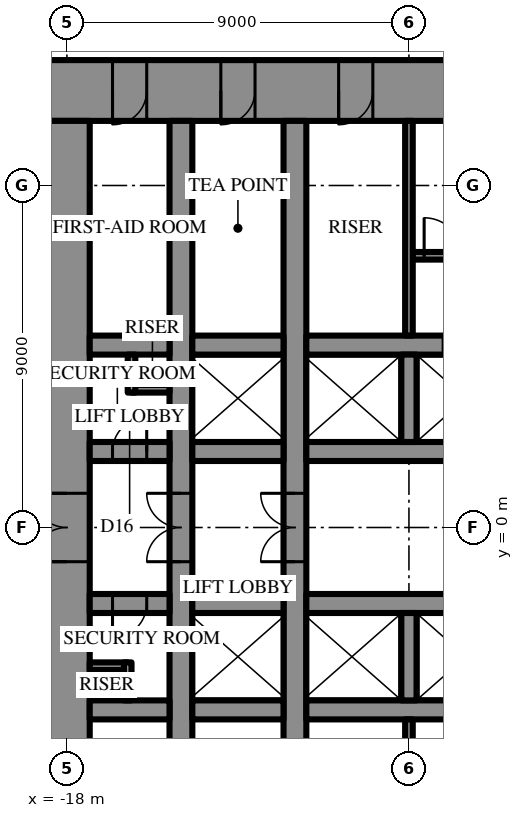
"""IFC4 building model, lengths in metres.
Left out: names, types, materials, properties, quantities, classifications, styles, units other than length and angle.
Written with IfcOpenShell. Run it as: python <this file> out.ifc"""

import sys

from ifc_helpers import new_model, si_unit, direction, frame, frame_2d, origin, place, context, subcontext, project, spatial, rectangle, extrude, element, fill, save


model = new_model("IFC4")
c1 = context("Model", 3, precision=1e-05, world=origin(), true_north=direction((0.0, 1.0)))
c2 = subcontext(c1, "Body", "Model", "MODEL_VIEW")
j1 = project(units=[si_unit("LENGTHUNIT", "METRE"), si_unit("PLANEANGLEUNIT", "RADIAN")], contexts=[c1])
p1 = place(None, origin())
s1 = spatial("IfcSite", under=j1, at=p1, CompositionType="ELEMENT")
p2 = place(p1, origin())
s2 = spatial("IfcBuilding", under=s1, at=p2, CompositionType="ELEMENT")
p3 = place(p2, frame((0.0, 0.0, 195.1)))
s3 = spatial("IfcBuildingStorey", under=s2, at=p3, CompositionType="ELEMENT", Elevation=195.1)
p4 = place(p3, frame((-18.6, 11.5, 0.0), z_axis=(0.0, 0.0, 1.0), x_axis=(1.0, 0.0, 0.0)))
e1 = element("IfcWall", 1, at=p4, inside=s3, PredefinedType="SHEAR", context=c2, shape_type="SweptSolid", body=[
    extrude(rectangle(XDim=37.2, YDim=1.6, at=frame_2d((18.6, 0.0))), origin(), (0.0, 0.0, 1.0), 4.2),
])
p5 = place(p4, frame((19.45, 0.0, 0.0)))
e2 = element("IfcOpeningElement", 2, at=p5, cuts=e1, PredefinedType="OPENING", context=c2, shape_type="SweptSolid", body=[
    extrude(rectangle(XDim=0.9, YDim=2.2, at=frame_2d((0.45, 1.1))), frame((0.0, 0.81, 0.0), z_axis=(0.0, -1.0, 0.0), x_axis=(1.0, 0.0, 0.0)), (0.0, 0.0, 1.0), 1.62),
])
p6 = place(p4, frame((22.45, 0.0, 0.0)))
e3 = element("IfcOpeningElement", 3, at=p6, cuts=e1, PredefinedType="OPENING", context=c2, shape_type="SweptSolid", body=[
    extrude(rectangle(XDim=0.9, YDim=2.2, at=frame_2d((0.45, 1.1))), frame((0.0, 0.81, 0.0), z_axis=(0.0, -1.0, 0.0), x_axis=(1.0, 0.0, 0.0)), (0.0, 0.0, 1.0), 1.62),
])
p7 = place(p4, frame((25.5, 0.0, 0.0)))
e4 = element("IfcOpeningElement", 4, at=p7, cuts=e1, PredefinedType="OPENING", context=c2, shape_type="SweptSolid", body=[
    extrude(rectangle(XDim=1.0, YDim=2.2, at=frame_2d((0.5, 1.1))), frame((0.0, 0.81, 0.0), z_axis=(0.0, -1.0, 0.0), x_axis=(1.0, 0.0, 0.0)), (0.0, 0.0, 1.0), 1.62),
])
p8 = place(p4, frame((1.8, 0.0, 0.0)))
e5 = element("IfcOpeningElement", 5, at=p8, cuts=e1, PredefinedType="OPENING", context=c2, shape_type="SweptSolid", body=[
    extrude(rectangle(XDim=0.9, YDim=2.2, at=frame_2d((0.45, 1.1))), frame((0.0, 0.81, 0.0), z_axis=(0.0, -1.0, 0.0), x_axis=(1.0, 0.0, 0.0)), (0.0, 0.0, 1.0), 1.62),
])
p9 = place(p4, frame((4.65, 0.0, 0.0)))
e6 = element("IfcOpeningElement", 6, at=p9, cuts=e1, PredefinedType="OPENING", context=c2, shape_type="SweptSolid", body=[
    extrude(rectangle(XDim=0.9, YDim=2.2, at=frame_2d((0.45, 1.1))), frame((0.0, 0.81, 0.0), z_axis=(0.0, -1.0, 0.0), x_axis=(1.0, 0.0, 0.0)), (0.0, 0.0, 1.0), 1.62),
])
p10 = place(p4, frame((7.75, 0.0, 0.0)))
e7 = element("IfcOpeningElement", 7, at=p10, cuts=e1, PredefinedType="OPENING", context=c2, shape_type="SweptSolid", body=[
    extrude(rectangle(XDim=0.9, YDim=2.2, at=frame_2d((0.45, 1.1))), frame((0.0, 0.81, 0.0), z_axis=(0.0, -1.0, 0.0), x_axis=(1.0, 0.0, 0.0)), (0.0, 0.0, 1.0), 1.62),
])
p11 = place(p4, frame((28.55, 0.0, 0.0)))
e8 = element("IfcOpeningElement", 8, at=p11, cuts=e1, PredefinedType="OPENING", context=c2, shape_type="SweptSolid", body=[
    extrude(rectangle(XDim=0.9, YDim=2.2, at=frame_2d((0.45, 1.1))), frame((0.0, 0.81, 0.0), z_axis=(0.0, -1.0, 0.0), x_axis=(1.0, 0.0, 0.0)), (0.0, 0.0, 1.0), 1.62),
])
p12 = place(p4, frame((31.65, 0.0, 0.0)))
e9 = element("IfcOpeningElement", 9, at=p12, cuts=e1, PredefinedType="OPENING", context=c2, shape_type="SweptSolid", body=[
    extrude(rectangle(XDim=0.9, YDim=2.2, at=frame_2d((0.45, 1.1))), frame((0.0, 0.81, 0.0), z_axis=(0.0, -1.0, 0.0), x_axis=(1.0, 0.0, 0.0)), (0.0, 0.0, 1.0), 1.62),
])
p13 = place(p4, frame((34.5, 0.0, 0.0)))
e10 = element("IfcOpeningElement", 10, at=p13, cuts=e1, PredefinedType="OPENING", context=c2, shape_type="SweptSolid", body=[
    extrude(rectangle(XDim=0.9, YDim=2.2, at=frame_2d((0.45, 1.1))), frame((0.0, 0.81, 0.0), z_axis=(0.0, -1.0, 0.0), x_axis=(1.0, 0.0, 0.0)), (0.0, 0.0, 1.0), 1.62),
])
p14 = place(p3, frame((-18.0, 10.7, 0.0), z_axis=(0.0, 0.0, 1.0), x_axis=(0.0, -1.0, 0.0)))
e11 = element("IfcWall", 11, at=p14, inside=s3, PredefinedType="SHEAR", context=c2, shape_type="SweptSolid", body=[
    extrude(rectangle(XDim=21.4, YDim=1.2, at=frame_2d((10.7, 0.0))), origin(), (0.0, 0.0, 1.0), 4.2),
])
p15 = place(p14, frame((9.8, 0.0, 0.0)))
e12 = element("IfcOpeningElement", 12, at=p15, cuts=e11, PredefinedType="OPENING", context=c2, shape_type="SweptSolid", body=[
    extrude(rectangle(XDim=1.8, YDim=2.4, at=frame_2d((0.9, 1.2))), frame((0.0, 0.61, 0.0), z_axis=(0.0, -1.0, 0.0), x_axis=(1.0, 0.0, 0.0)), (0.0, 0.0, 1.0), 1.22),
])
p16 = place(p3, frame((-12.0, -10.7, 0.0), z_axis=(0.0, 0.0, 1.0), x_axis=(0.0, 1.0, 0.0)))
e13 = element("IfcWall", 13, at=p16, inside=s3, PredefinedType="SHEAR", context=c2, shape_type="SweptSolid", body=[
    extrude(rectangle(XDim=21.4, YDim=0.6, at=frame_2d((10.7, 0.0))), origin(), (0.0, 0.0, 1.0), 4.2),
])
p17 = place(p16, frame((9.8, 0.0, 0.0)))
e14 = element("IfcOpeningElement", 14, at=p17, cuts=e13, PredefinedType="OPENING", context=c2, shape_type="SweptSolid", body=[
    extrude(rectangle(XDim=1.8, YDim=2.4, at=frame_2d((0.9, 1.2))), frame((0.0, 0.31, 0.0), z_axis=(0.0, -1.0, 0.0), x_axis=(1.0, 0.0, 0.0)), (0.0, 0.0, 1.0), 0.62),
])
p18 = place(p3, frame((-15.0, -10.7, 0.0), z_axis=(0.0, 0.0, 1.0), x_axis=(0.0, 1.0, 0.0)))
e15 = element("IfcWall", 15, at=p18, inside=s3, PredefinedType="SHEAR", context=c2, shape_type="SweptSolid", body=[
    extrude(rectangle(XDim=21.4, YDim=0.6, at=frame_2d((10.7, 0.0))), origin(), (0.0, 0.0, 1.0), 4.2),
])
p19 = place(p18, frame((9.8, 0.0, 0.0)))
e16 = element("IfcOpeningElement", 16, at=p19, cuts=e15, PredefinedType="OPENING", context=c2, shape_type="SweptSolid", body=[
    extrude(rectangle(XDim=1.8, YDim=2.4, at=frame_2d((0.9, 1.2))), frame((0.0, 0.31, 0.0), z_axis=(0.0, -1.0, 0.0), x_axis=(1.0, 0.0, 0.0)), (0.0, 0.0, 1.0), 0.62),
])
p20 = place(p3, frame((-17.4, 2.0, 0.0), z_axis=(0.0, 0.0, 1.0), x_axis=(1.0, 0.0, 0.0)))
e17 = element("IfcWall", 17, at=p20, inside=s3, PredefinedType="SHEAR", context=c2, shape_type="SweptSolid", body=[
    extrude(rectangle(XDim=2.1, YDim=0.5, at=frame_2d((1.05, 0.0))), origin(), (0.0, 0.0, 1.0), 4.2),
])
p21 = place(p20, frame((0.6, 0.0, 0.0)))
e18 = element("IfcOpeningElement", 18, at=p21, cuts=e17, PredefinedType="OPENING", context=c2, shape_type="SweptSolid", body=[
    extrude(rectangle(XDim=0.9, YDim=2.2, at=frame_2d((0.45, 1.1))), frame((0.0, 0.26, 0.0), z_axis=(0.0, -1.0, 0.0), x_axis=(1.0, 0.0, 0.0)), (0.0, 0.0, 1.0), 0.52),
])
p22 = place(p3, frame((-14.7, 2.0, 0.0), z_axis=(0.0, 0.0, 1.0), x_axis=(1.0, 0.0, 0.0)))
e19 = element("IfcWall", 19, at=p22, inside=s3, PredefinedType="SHEAR", context=c2, shape_type="SweptSolid", body=[
    extrude(rectangle(XDim=2.4, YDim=0.5, at=frame_2d((1.2, 0.0))), origin(), (0.0, 0.0, 1.0), 4.2),
])
p23 = place(p3, frame((-11.7, 2.0, 0.0), z_axis=(0.0, 0.0, 1.0), x_axis=(1.0, 0.0, 0.0)))
e20 = element("IfcWall", 20, at=p23, inside=s3, PredefinedType="SHEAR", context=c2, shape_type="SweptSolid", body=[
    extrude(rectangle(XDim=5.9, YDim=0.5, at=frame_2d((2.95, 0.0))), origin(), (0.0, 0.0, 1.0), 4.2),
])
p24 = place(p3, frame((-17.4, 4.8, 0.0), z_axis=(0.0, 0.0, 1.0), x_axis=(1.0, 0.0, 0.0)))
e21 = element("IfcWall", 21, at=p24, inside=s3, PredefinedType="SHEAR", context=c2, shape_type="SweptSolid", body=[
    extrude(rectangle(XDim=2.1, YDim=0.5, at=frame_2d((1.05, 0.0))), origin(), (0.0, 0.0, 1.0), 4.2),
])
p25 = place(p3, frame((-14.7, 4.8, 0.0), z_axis=(0.0, 0.0, 1.0), x_axis=(1.0, 0.0, 0.0)))
e22 = element("IfcWall", 22, at=p25, inside=s3, PredefinedType="SHEAR", context=c2, shape_type="SweptSolid", body=[
    extrude(rectangle(XDim=2.4, YDim=0.5, at=frame_2d((1.2, 0.0))), origin(), (0.0, 0.0, 1.0), 4.2),
])
p26 = place(p3, frame((-11.7, 4.8, 0.0), z_axis=(0.0, 0.0, 1.0), x_axis=(1.0, 0.0, 0.0)))
e23 = element("IfcWall", 23, at=p26, inside=s3, PredefinedType="SHEAR", context=c2, shape_type="SweptSolid", body=[
    extrude(rectangle(XDim=23.4, YDim=0.5, at=frame_2d((11.7, 0.0))), origin(), (0.0, 0.0, 1.0), 4.2),
])
p27 = place(p26, frame((6.6, 0.0, 0.0)))
e24 = element("IfcOpeningElement", 24, at=p27, cuts=e23, PredefinedType="OPENING", context=c2, shape_type="SweptSolid", body=[
    extrude(rectangle(XDim=1.2, YDim=2.2, at=frame_2d((0.6, 1.1))), frame((0.0, 0.26, 0.0), z_axis=(0.0, -1.0, 0.0), x_axis=(1.0, 0.0, 0.0)), (0.0, 0.0, 1.0), 0.52),
])
p28 = place(p26, frame((3.6, 0.0, 0.0)))
e25 = element("IfcOpeningElement", 25, at=p28, cuts=e23, PredefinedType="OPENING", context=c2, shape_type="SweptSolid", body=[
    extrude(rectangle(XDim=1.2, YDim=2.2, at=frame_2d((0.6, 1.1))), frame((0.0, 0.26, 0.0), z_axis=(0.0, -1.0, 0.0), x_axis=(1.0, 0.0, 0.0)), (0.0, 0.0, 1.0), 0.52),
])
p29 = place(p3, frame((-9.0, 2.25, 0.0), z_axis=(0.0, 0.0, 1.0), x_axis=(0.0, 1.0, 0.0)))
e26 = element("IfcWall", 26, at=p29, inside=s3, PredefinedType="SHEAR", context=c2, shape_type="SweptSolid", body=[
    extrude(rectangle(XDim=2.3, YDim=0.4, at=frame_2d((1.15, 0.0))), origin(), (0.0, 0.0, 1.0), 4.2),
])
p30 = place(p3, frame((-8.9, 7.15, 0.0), z_axis=(0.0, 0.0, 1.0), x_axis=(1.0, 0.0, 0.0)))
e27 = element("IfcWall", 27, at=p30, inside=s3, PredefinedType="SHEAR", context=c2, shape_type="SweptSolid", body=[
    extrude(rectangle(XDim=8.6, YDim=0.2, at=frame_2d((4.3, 0.0))), origin(), (0.0, 0.0, 1.0), 4.2),
])
p31 = place(p30, frame((0.3, 0.0, 0.0)))
e28 = element("IfcOpeningElement", 28, at=p31, cuts=e27, PredefinedType="OPENING", context=c2, shape_type="SweptSolid", body=[
    extrude(rectangle(XDim=1.0, YDim=2.2, at=frame_2d((0.5, 1.1))), frame((0.0, 0.11, 0.0), z_axis=(0.0, -1.0, 0.0), x_axis=(1.0, 0.0, 0.0)), (0.0, 0.0, 1.0), 0.22),
])
p32 = place(p3, frame((3.2, -2.0, 0.0), z_axis=(0.0, 0.0, 1.0), x_axis=(-1.0, 0.0, 0.0)))
e29 = element("IfcWall", 29, at=p32, inside=s3, PredefinedType="SHEAR", context=c2, shape_type="SweptSolid", body=[
    extrude(rectangle(XDim=14.9, YDim=0.5, at=frame_2d((7.45, 0.0))), origin(), (0.0, 0.0, 1.0), 4.2),
])
p33 = place(p32, frame((1.15, 0.0, 0.0)))
e30 = element("IfcOpeningElement", 30, at=p33, cuts=e29, PredefinedType="OPENING", context=c2, shape_type="SweptSolid", body=[
    extrude(rectangle(XDim=1.1, YDim=2.2, at=frame_2d((0.55, 1.1))), frame((0.0, 0.26, 0.0), z_axis=(0.0, -1.0, 0.0), x_axis=(1.0, 0.0, 0.0)), (0.0, 0.0, 1.0), 0.52),
])
p34 = place(p32, frame((4.15, 0.0, 0.0)))
e31 = element("IfcOpeningElement", 31, at=p34, cuts=e29, PredefinedType="OPENING", context=c2, shape_type="SweptSolid", body=[
    extrude(rectangle(XDim=1.1, YDim=2.2, at=frame_2d((0.55, 1.1))), frame((0.0, 0.26, 0.0), z_axis=(0.0, -1.0, 0.0), x_axis=(1.0, 0.0, 0.0)), (0.0, 0.0, 1.0), 0.52),
])
p35 = place(p32, frame((7.15, 0.0, 0.0)))
e32 = element("IfcOpeningElement", 32, at=p35, cuts=e29, PredefinedType="OPENING", context=c2, shape_type="SweptSolid", body=[
    extrude(rectangle(XDim=1.1, YDim=2.2, at=frame_2d((0.55, 1.1))), frame((0.0, 0.26, 0.0), z_axis=(0.0, -1.0, 0.0), x_axis=(1.0, 0.0, 0.0)), (0.0, 0.0, 1.0), 0.52),
])
p36 = place(p32, frame((10.15, 0.0, 0.0)))
e33 = element("IfcOpeningElement", 33, at=p36, cuts=e29, PredefinedType="OPENING", context=c2, shape_type="SweptSolid", body=[
    extrude(rectangle(XDim=1.1, YDim=2.2, at=frame_2d((0.55, 1.1))), frame((0.0, 0.26, 0.0), z_axis=(0.0, -1.0, 0.0), x_axis=(1.0, 0.0, 0.0)), (0.0, 0.0, 1.0), 0.52),
])
p37 = place(p3, frame((-12.3, -2.0, 0.0), z_axis=(0.0, 0.0, 1.0), x_axis=(-1.0, 0.0, 0.0)))
e34 = element("IfcWall", 34, at=p37, inside=s3, PredefinedType="SHEAR", context=c2, shape_type="SweptSolid", body=[
    extrude(rectangle(XDim=2.4, YDim=0.5, at=frame_2d((1.2, 0.0))), origin(), (0.0, 0.0, 1.0), 4.2),
])
p38 = place(p3, frame((-15.3, -2.0, 0.0), z_axis=(0.0, 0.0, 1.0), x_axis=(-1.0, 0.0, 0.0)))
e35 = element("IfcWall", 35, at=p38, inside=s3, PredefinedType="SHEAR", context=c2, shape_type="SweptSolid", body=[
    extrude(rectangle(XDim=2.1, YDim=0.5, at=frame_2d((1.05, 0.0))), origin(), (0.0, 0.0, 1.0), 4.2),
])
p39 = place(p38, frame((0.6, 0.0, 0.0)))
e36 = element("IfcOpeningElement", 36, at=p39, cuts=e35, PredefinedType="OPENING", context=c2, shape_type="SweptSolid", body=[
    extrude(rectangle(XDim=0.9, YDim=2.2, at=frame_2d((0.45, 1.1))), frame((0.0, 0.26, 0.0), z_axis=(0.0, -1.0, 0.0), x_axis=(1.0, 0.0, 0.0)), (0.0, 0.0, 1.0), 0.52),
])
p40 = place(p3, frame((11.7, -4.8, 0.0), z_axis=(0.0, 0.0, 1.0), x_axis=(-1.0, 0.0, 0.0)))
e37 = element("IfcWall", 37, at=p40, inside=s3, PredefinedType="SHEAR", context=c2, shape_type="SweptSolid", body=[
    extrude(rectangle(XDim=23.4, YDim=0.5, at=frame_2d((11.7, 0.0))), origin(), (0.0, 0.0, 1.0), 4.2),
])
p41 = place(p40, frame((6.6, 0.0, 0.0)))
e38 = element("IfcOpeningElement", 38, at=p41, cuts=e37, PredefinedType="OPENING", context=c2, shape_type="SweptSolid", body=[
    extrude(rectangle(XDim=1.2, YDim=2.2, at=frame_2d((0.6, 1.1))), frame((0.0, 0.26, 0.0), z_axis=(0.0, -1.0, 0.0), x_axis=(1.0, 0.0, 0.0)), (0.0, 0.0, 1.0), 0.52),
])
p42 = place(p40, frame((3.6, 0.0, 0.0)))
e39 = element("IfcOpeningElement", 39, at=p42, cuts=e37, PredefinedType="OPENING", context=c2, shape_type="SweptSolid", body=[
    extrude(rectangle(XDim=1.2, YDim=2.2, at=frame_2d((0.6, 1.1))), frame((0.0, 0.26, 0.0), z_axis=(0.0, -1.0, 0.0), x_axis=(1.0, 0.0, 0.0)), (0.0, 0.0, 1.0), 0.52),
])
p43 = place(p3, frame((-12.3, -4.8, 0.0), z_axis=(0.0, 0.0, 1.0), x_axis=(-1.0, 0.0, 0.0)))
e40 = element("IfcWall", 40, at=p43, inside=s3, PredefinedType="SHEAR", context=c2, shape_type="SweptSolid", body=[
    extrude(rectangle(XDim=2.4, YDim=0.5, at=frame_2d((1.2, 0.0))), origin(), (0.0, 0.0, 1.0), 4.2),
])
p44 = place(p3, frame((-15.3, -4.8, 0.0), z_axis=(0.0, 0.0, 1.0), x_axis=(-1.0, 0.0, 0.0)))
e41 = element("IfcWall", 41, at=p44, inside=s3, PredefinedType="SHEAR", context=c2, shape_type="SweptSolid", body=[
    extrude(rectangle(XDim=2.1, YDim=0.5, at=frame_2d((1.05, 0.0))), origin(), (0.0, 0.0, 1.0), 4.2),
])
p45 = place(p3, frame((-9.0, -2.25, 0.0), z_axis=(0.0, 0.0, 1.0), x_axis=(0.0, -1.0, 0.0)))
e42 = element("IfcWall", 42, at=p45, inside=s3, PredefinedType="SHEAR", context=c2, shape_type="SweptSolid", body=[
    extrude(rectangle(XDim=2.3, YDim=0.4, at=frame_2d((1.15, 0.0))), origin(), (0.0, 0.0, 1.0), 4.2),
])
for number, where, z_axis, x_axis in (
    (43, (-9.0, 5.05, 0.0), (0.0, 0.0, 1.0), (0.0, 1.0, 0.0)),
    (44, (-9.0, -5.05, 0.0), (0.0, 0.0, 1.0), (0.0, -1.0, 0.0)),
):
    element("IfcWall", number, at=place(p3, frame(where, z_axis=z_axis, x_axis=x_axis)), inside=s3, PredefinedType="PARTITIONING", context=c2, shape_type="SweptSolid", body=[
        extrude(rectangle(XDim=5.65, YDim=0.2, at=frame_2d((2.825, 0.0))), origin(), (0.0, 0.0, 1.0), 4.0),
    ])
for number, where, z_axis, x_axis in (
    (45, (-16.3, 3.65, 0.0), (0.0, 0.0, 1.0), (1.0, 0.0, 0.0)),
    (46, (-16.3, 3.55, 0.0), (0.0, 0.0, 1.0), (0.0, 1.0, 0.0)),
    (47, (-16.4, -3.65, 0.0), (0.0, 0.0, 1.0), (-1.0, 0.0, 0.0)),
    (48, (-16.4, -3.55, 0.0), (0.0, 0.0, 1.0), (0.0, -1.0, 0.0)),
):
    element("IfcWall", number, at=place(p3, frame(where, z_axis=z_axis, x_axis=x_axis)), inside=s3, PredefinedType="PARTITIONING", context=c2, shape_type="SweptSolid", body=[
        extrude(rectangle(XDim=1.0, YDim=0.2, at=frame_2d((0.5, 0.0))), origin(), (0.0, 0.0, 1.0), 4.0),
    ])
p46 = place(p15, frame((1.8, 0.0, 0.0), z_axis=(0.0, 0.0, 1.0), x_axis=(-1.0, 0.0, 0.0)))
e49 = element("IfcDoor", 49, at=p46, inside=s3, OperationType="DOUBLE_DOOR_SINGLE_SWING", PredefinedType="DOOR", context=c2, shape_type="SweptSolid", body=[
    extrude(rectangle(XDim=1.8, YDim=2.4, at=frame_2d((0.9, 1.2))), frame((0.0, 0.025, 0.0), z_axis=(0.0, -1.0, 0.0), x_axis=(1.0, 0.0, 0.0)), (0.0, 0.0, 1.0), 0.05),
])
fill(e12, e49)
p47 = place(p31, origin())
e50 = element("IfcDoor", 50, at=p47, inside=s3, OperationType="SINGLE_SWING_RIGHT", PredefinedType="DOOR", context=c2, shape_type="SweptSolid", body=[
    extrude(rectangle(XDim=1.0, YDim=2.2, at=frame_2d((0.5, 1.1))), frame((0.0, 0.025, 0.0), z_axis=(0.0, -1.0, 0.0), x_axis=(1.0, 0.0, 0.0)), (0.0, 0.0, 1.0), 0.05),
])
fill(e28, e50)
p48 = place(p8, frame((0.9, 0.0, 0.0), z_axis=(0.0, 0.0, 1.0), x_axis=(-1.0, 0.0, 0.0)))
e51 = element("IfcDoor", 51, at=p48, inside=s3, OperationType="SINGLE_SWING_LEFT", PredefinedType="DOOR", context=c2, shape_type="SweptSolid", body=[
    extrude(rectangle(XDim=0.9, YDim=2.2, at=frame_2d((0.45, 1.1))), frame((0.0, 0.025, 0.0), z_axis=(0.0, -1.0, 0.0), x_axis=(1.0, 0.0, 0.0)), (0.0, 0.0, 1.0), 0.05),
])
fill(e5, e51)
p49 = place(p9, frame((0.9, 0.0, 0.0), z_axis=(0.0, 0.0, 1.0), x_axis=(-1.0, 0.0, 0.0)))
e52 = element("IfcDoor", 52, at=p49, inside=s3, OperationType="SINGLE_SWING_LEFT", PredefinedType="DOOR", context=c2, shape_type="SweptSolid", body=[
    extrude(rectangle(XDim=0.9, YDim=2.2, at=frame_2d((0.45, 1.1))), frame((0.0, 0.025, 0.0), z_axis=(0.0, -1.0, 0.0), x_axis=(1.0, 0.0, 0.0)), (0.0, 0.0, 1.0), 0.05),
])
fill(e6, e52)
p50 = place(p10, frame((0.9, 0.0, 0.0), z_axis=(0.0, 0.0, 1.0), x_axis=(-1.0, 0.0, 0.0)))
e53 = element("IfcDoor", 53, at=p50, inside=s3, OperationType="SINGLE_SWING_LEFT", PredefinedType="DOOR", context=c2, shape_type="SweptSolid", body=[
    extrude(rectangle(XDim=0.9, YDim=2.2, at=frame_2d((0.45, 1.1))), frame((0.0, 0.025, 0.0), z_axis=(0.0, -1.0, 0.0), x_axis=(1.0, 0.0, 0.0)), (0.0, 0.0, 1.0), 0.05),
])
fill(e7, e53)
p51 = place(p21, origin())
e54 = element("IfcDoor", 54, at=p51, inside=s3, OperationType="SINGLE_SWING_LEFT", PredefinedType="DOOR", context=c2, shape_type="SweptSolid", body=[
    extrude(rectangle(XDim=0.9, YDim=2.2, at=frame_2d((0.45, 1.1))), frame((0.0, 0.025, 0.0), z_axis=(0.0, -1.0, 0.0), x_axis=(1.0, 0.0, 0.0)), (0.0, 0.0, 1.0), 0.05),
])
fill(e18, e54)
p52 = place(p39, origin())
e55 = element("IfcDoor", 55, at=p52, inside=s3, OperationType="SINGLE_SWING_LEFT", PredefinedType="DOOR", context=c2, shape_type="SweptSolid", body=[
    extrude(rectangle(XDim=0.9, YDim=2.2, at=frame_2d((0.45, 1.1))), frame((0.0, 0.025, 0.0), z_axis=(0.0, -1.0, 0.0), x_axis=(1.0, 0.0, 0.0)), (0.0, 0.0, 1.0), 0.05),
])
fill(e36, e55)
p53 = place(p17, origin())
e56 = element("IfcDoor", 56, at=p53, inside=s3, OperationType="DOUBLE_DOOR_SINGLE_SWING", PredefinedType="DOOR", context=c2, shape_type="SweptSolid", body=[
    extrude(rectangle(XDim=1.8, YDim=2.4, at=frame_2d((0.9, 1.2))), frame((0.0, 0.025, 0.0), z_axis=(0.0, -1.0, 0.0), x_axis=(1.0, 0.0, 0.0)), (0.0, 0.0, 1.0), 0.05),
])
fill(e14, e56)
p54 = place(p19, origin())
e57 = element("IfcDoor", 57, at=p54, inside=s3, OperationType="DOUBLE_DOOR_SINGLE_SWING", PredefinedType="DOOR", context=c2, shape_type="SweptSolid", body=[
    extrude(rectangle(XDim=1.8, YDim=2.4, at=frame_2d((0.9, 1.2))), frame((0.0, 0.025, 0.0), z_axis=(0.0, -1.0, 0.0), x_axis=(1.0, 0.0, 0.0)), (0.0, 0.0, 1.0), 0.05),
])
fill(e16, e57)
save(model, sys.argv[1])
